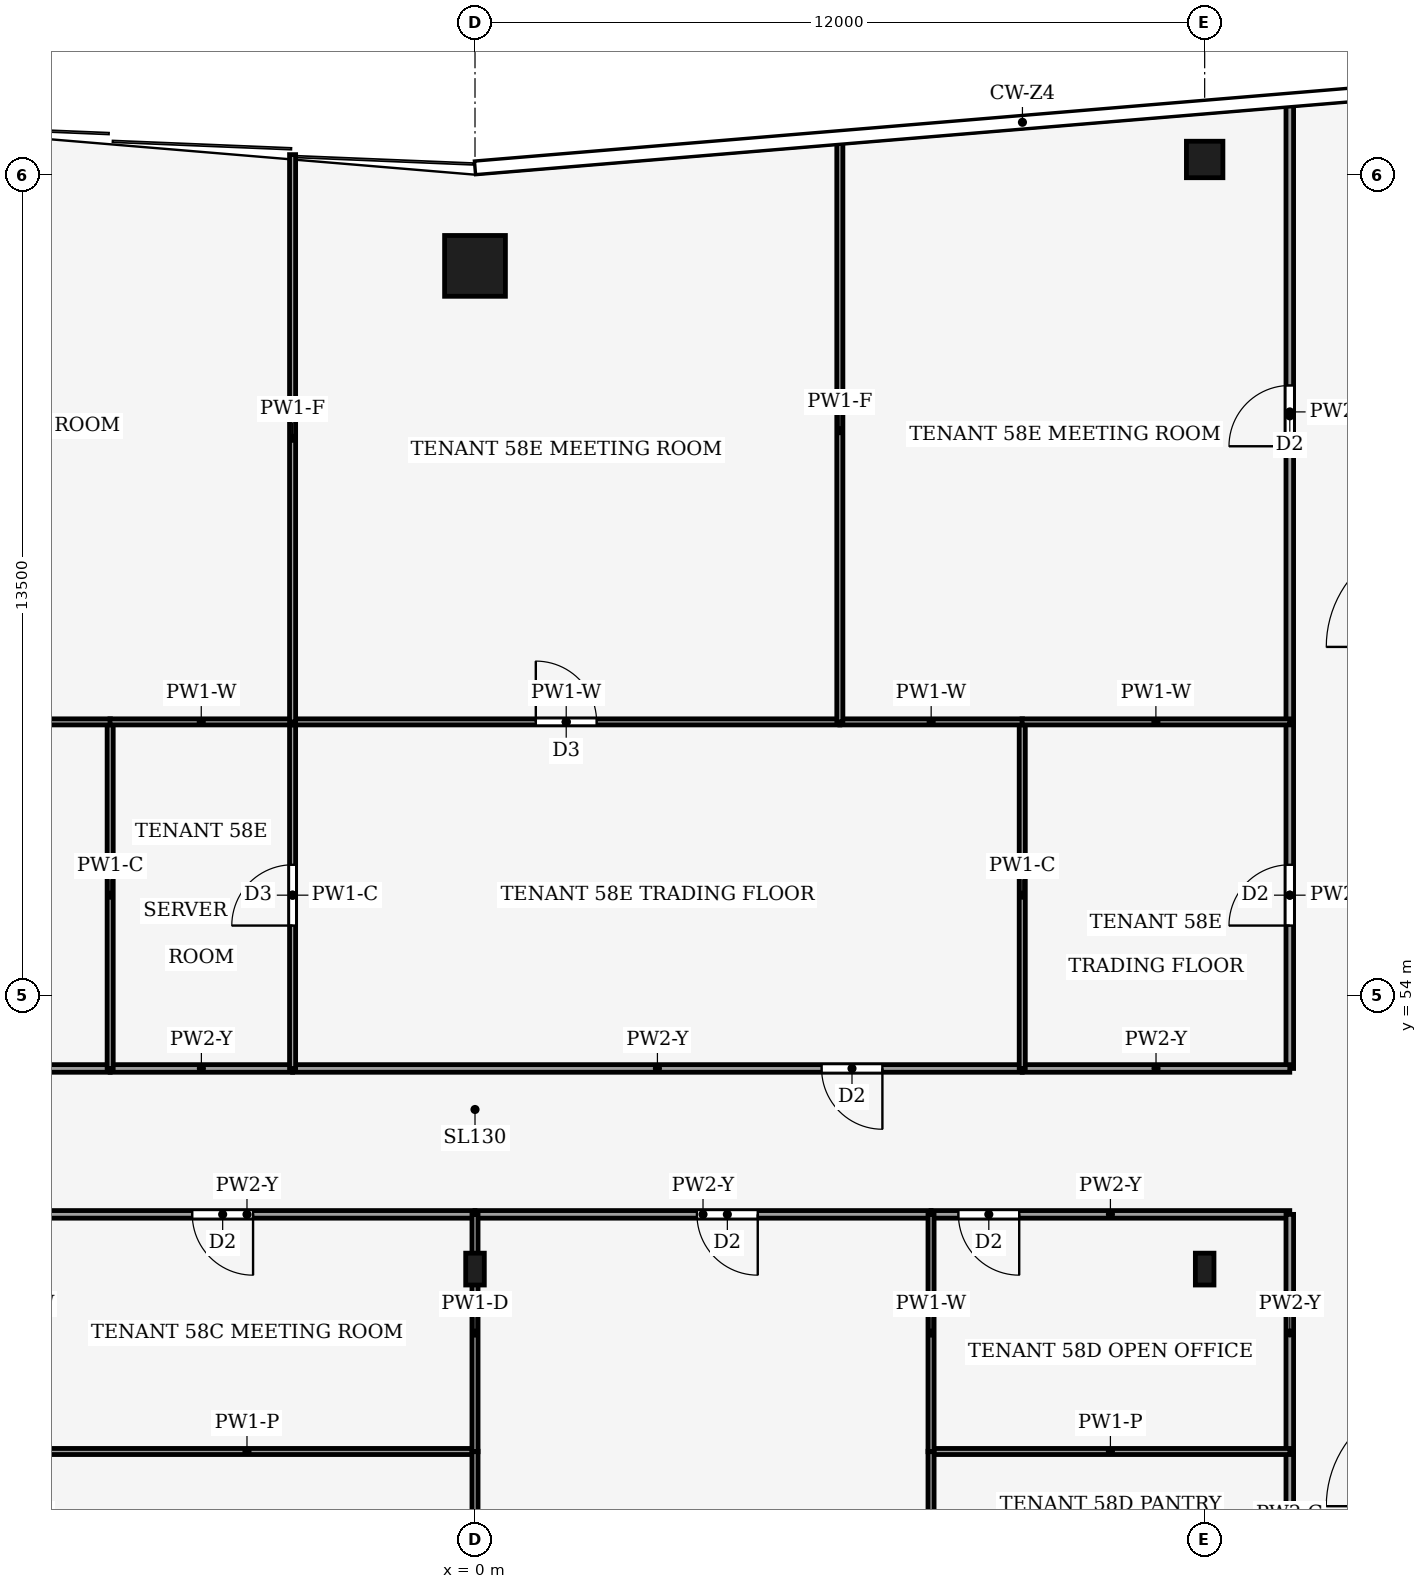
"""IFC4 building model, lengths in metres.
Left out: names, types, materials, properties, quantities, classifications, styles, units other than length and angle.
Written with IfcOpenShell. Run it as: python <this file> out.ifc"""

import sys

from ifc_helpers import new_model, si_unit, direction, frame, frame_2d, origin, origin_2d, place, context, subcontext, project, spatial, rectangle, hollow_rectangle, i_section, extrude, element, fill, save


model = new_model("IFC4")
c1 = context("Model", 3, precision=1e-05, world=origin(), true_north=direction((0.0, 1.0)))
c2 = subcontext(c1, "Body", "Model", "MODEL_VIEW")
j1 = project(units=[si_unit("LENGTHUNIT", "METRE"), si_unit("PLANEANGLEUNIT", "RADIAN")], contexts=[c1])
p1 = place(None, origin())
s1 = spatial("IfcSite", under=j1, at=p1, CompositionType="ELEMENT")
p2 = place(p1, origin())
s2 = spatial("IfcBuilding", under=s1, at=p2, CompositionType="ELEMENT")
p3 = place(p2, frame((0.0, 0.0, 254.0)))
s3 = spatial("IfcBuildingStorey", under=s2, at=p3, CompositionType="ELEMENT", Elevation=254.0)
p4 = place(p3, frame((0.0, 66.0, 0.0), z_axis=(0.0, 0.0, 1.0), x_axis=(1.0, 0.0, 0.0)))
e1 = element("IfcColumn", 1, at=p4, inside=s3, PredefinedType="COLUMN", context=c2, shape_type="SweptSolid", body=[
    extrude(hollow_rectangle(XDim=1.0, YDim=1.0, WallThickness=0.045, at=origin_2d()), origin(), (0.0, 0.0, 1.0), 4.0),
])
p5 = place(p3, frame((12.0, 67.75, 0.0), z_axis=(0.0, 0.0, 1.0), x_axis=(1.0, 0.0, 0.0)))
e2 = element("IfcColumn", 2, at=p5, inside=s3, PredefinedType="COLUMN", context=c2, shape_type="SweptSolid", body=[
    extrude(hollow_rectangle(XDim=0.6, YDim=0.6, WallThickness=0.025, at=origin_2d()), origin(), (0.0, 0.0, 1.0), 4.0),
])
for number, where, z_axis, x_axis in (
    (3, (0.0, 49.5, 0.0), (0.0, 0.0, 1.0), (1.0, 0.0, 0.0)),
    (4, (12.0, 49.5, 0.0), (0.0, 0.0, 1.0), (1.0, 0.0, 0.0)),
):
    element("IfcColumn", number, at=place(p3, frame(where, z_axis=z_axis, x_axis=x_axis)), inside=s3, PredefinedType="COLUMN", context=c2, shape_type="SweptSolid", body=[
        extrude(i_section(OverallWidth=0.306, OverallDepth=0.524, WebThickness=0.012, FlangeThickness=0.04, FilletRadius=0.027, at=origin_2d()), origin(), (0.0, 0.0, 1.0), 4.0),
    ])
p6 = place(p3, frame((0.0, 50.4, 0.0), z_axis=(0.0, 0.0, 1.0), x_axis=(-1.0, 0.0, 0.0)))
e5 = element("IfcWall", 5, at=p6, inside=s3, PredefinedType="PARTITIONING", context=c2, shape_type="SweptSolid", body=[
    extrude(rectangle(XDim=7.5, YDim=0.125, at=frame_2d((3.75, 0.0))), origin(), (0.0, 0.0, 1.0), 3.24),
])
p7 = place(p6, frame((3.65, 0.0, 0.0)))
e6 = element("IfcOpeningElement", 6, at=p7, cuts=e5, PredefinedType="OPENING", context=c2, shape_type="SweptSolid", body=[
    extrude(rectangle(XDim=1.0, YDim=2.1, at=frame_2d((0.5, 1.05))), frame((0.0, 0.073, 0.0), z_axis=(0.0, -1.0, 0.0), x_axis=(1.0, 0.0, 0.0)), (0.0, 0.0, 1.0), 0.145),
])
p8 = place(p3, frame((13.4, 43.5, 0.0), z_axis=(0.0, 0.0, 1.0), x_axis=(0.0, 1.0, 0.0)))
e7 = element("IfcWall", 7, at=p8, inside=s3, PredefinedType="PARTITIONING", context=c2, shape_type="SweptSolid", body=[
    extrude(rectangle(XDim=3.0, YDim=0.125, at=frame_2d((1.5, 0.0))), origin(), (0.0, 0.0, 1.0), 3.87),
])
p9 = place(p3, frame((13.4, 50.4, 0.0), z_axis=(0.0, 0.0, 1.0), x_axis=(-1.0, 0.0, 0.0)))
e8 = element("IfcWall", 8, at=p9, inside=s3, PredefinedType="PARTITIONING", context=c2, shape_type="SweptSolid", body=[
    extrude(rectangle(XDim=5.9, YDim=0.125, at=frame_2d((2.95, 0.0))), origin(), (0.0, 0.0, 1.0), 3.24),
])
p10 = place(p9, frame((4.45, 0.0, 0.0)))
e9 = element("IfcOpeningElement", 9, at=p10, cuts=e8, PredefinedType="OPENING", context=c2, shape_type="SweptSolid", body=[
    extrude(rectangle(XDim=1.0, YDim=2.1, at=frame_2d((0.5, 1.05))), frame((0.0, 0.073, 0.0), z_axis=(0.0, -1.0, 0.0), x_axis=(1.0, 0.0, 0.0)), (0.0, 0.0, 1.0), 0.145),
])
p11 = place(p3, frame((13.4, 46.5, 0.0), z_axis=(0.0, 0.0, 1.0), x_axis=(0.0, 1.0, 0.0)))
e10 = element("IfcWall", 10, at=p11, inside=s3, PredefinedType="PARTITIONING", context=c2, shape_type="SweptSolid", body=[
    extrude(rectangle(XDim=3.9, YDim=0.125, at=frame_2d((1.95, 0.0))), origin(), (0.0, 0.0, 1.0), 3.24),
])
p12 = place(p3, frame((7.5, 50.4, 0.0), z_axis=(0.0, 0.0, 1.0), x_axis=(-1.0, 0.0, 0.0)))
e11 = element("IfcWall", 11, at=p12, inside=s3, PredefinedType="PARTITIONING", context=c2, shape_type="SweptSolid", body=[
    extrude(rectangle(XDim=7.5, YDim=0.125, at=frame_2d((3.75, 0.0))), origin(), (0.0, 0.0, 1.0), 3.24),
])
p13 = place(p12, frame((2.85, 0.0, 0.0)))
e12 = element("IfcOpeningElement", 12, at=p13, cuts=e11, PredefinedType="OPENING", context=c2, shape_type="SweptSolid", body=[
    extrude(rectangle(XDim=1.0, YDim=2.1, at=frame_2d((0.5, 1.05))), frame((0.0, 0.073, 0.0), z_axis=(0.0, -1.0, 0.0), x_axis=(1.0, 0.0, 0.0)), (0.0, 0.0, 1.0), 0.145),
])
p14 = place(p3, frame((-13.4, 52.8, 0.0), z_axis=(0.0, 0.0, 1.0), x_axis=(1.0, 0.0, 0.0)))
e13 = element("IfcWall", 13, at=p14, inside=s3, PredefinedType="PARTITIONING", context=c2, shape_type="SweptSolid", body=[
    extrude(rectangle(XDim=7.4, YDim=0.125, at=frame_2d((3.7, 0.0))), origin(), (0.0, 0.0, 1.0), 3.24),
])
p15 = place(p14, frame((3.2, 0.0, 0.0)))
e14 = element("IfcOpeningElement", 14, at=p15, cuts=e13, PredefinedType="OPENING", context=c2, shape_type="SweptSolid", body=[
    extrude(rectangle(XDim=1.0, YDim=2.1, at=frame_2d((0.5, 1.05))), frame((0.0, 0.073, 0.0), z_axis=(0.0, -1.0, 0.0), x_axis=(1.0, 0.0, 0.0)), (0.0, 0.0, 1.0), 0.145),
])
p16 = place(p3, frame((-3.0, 52.8, 0.0), z_axis=(0.0, 0.0, 1.0), x_axis=(-1.0, 0.0, 0.0)))
e15 = element("IfcWall", 15, at=p16, inside=s3, PredefinedType="PARTITIONING", context=c2, shape_type="SweptSolid", body=[
    extrude(rectangle(XDim=3.0, YDim=0.125, at=frame_2d((1.5, 0.0))), origin(), (0.0, 0.0, 1.0), 3.24),
])
p17 = place(p3, frame((9.0, 52.8, 0.0), z_axis=(0.0, 0.0, 1.0), x_axis=(-1.0, 0.0, 0.0)))
e16 = element("IfcWall", 16, at=p17, inside=s3, PredefinedType="PARTITIONING", context=c2, shape_type="SweptSolid", body=[
    extrude(rectangle(XDim=12.0, YDim=0.125, at=frame_2d((6.0, 0.0))), origin(), (0.0, 0.0, 1.0), 3.24),
])
p18 = place(p17, frame((2.3, 0.0, 0.0)))
e17 = element("IfcOpeningElement", 17, at=p18, cuts=e16, PredefinedType="OPENING", context=c2, shape_type="SweptSolid", body=[
    extrude(rectangle(XDim=1.0, YDim=2.1, at=frame_2d((0.5, 1.05))), frame((0.0, 0.073, 0.0), z_axis=(0.0, -1.0, 0.0), x_axis=(1.0, 0.0, 0.0)), (0.0, 0.0, 1.0), 0.145),
])
p19 = place(p3, frame((13.4, 52.8, 0.0), z_axis=(0.0, 0.0, 1.0), x_axis=(0.0, 1.0, 0.0)))
e18 = element("IfcWall", 18, at=p19, inside=s3, PredefinedType="PARTITIONING", context=c2, shape_type="SweptSolid", body=[
    extrude(rectangle(XDim=5.7, YDim=0.125, at=frame_2d((2.85, 0.0))), origin(), (0.0, 0.0, 1.0), 3.87),
])
p20 = place(p19, frame((2.35, 0.0, 0.0)))
e19 = element("IfcOpeningElement", 19, at=p20, cuts=e18, PredefinedType="OPENING", context=c2, shape_type="SweptSolid", body=[
    extrude(rectangle(XDim=1.0, YDim=2.1, at=frame_2d((0.5, 1.05))), frame((0.0, 0.073, 0.0), z_axis=(0.0, -1.0, 0.0), x_axis=(1.0, 0.0, 0.0)), (0.0, 0.0, 1.0), 0.145),
])
p21 = place(p3, frame((13.4, 52.8, 0.0), z_axis=(0.0, 0.0, 1.0), x_axis=(-1.0, 0.0, 0.0)))
e20 = element("IfcWall", 20, at=p21, inside=s3, PredefinedType="PARTITIONING", context=c2, shape_type="SweptSolid", body=[
    extrude(rectangle(XDim=4.4, YDim=0.125, at=frame_2d((2.2, 0.0))), origin(), (0.0, 0.0, 1.0), 3.24),
])
p22 = place(p3, frame((13.4, 58.5, 0.0), z_axis=(0.0, 0.0, 1.0), x_axis=(0.0, 1.0, 0.0)))
e21 = element("IfcWall", 21, at=p22, inside=s3, PredefinedType="PARTITIONING", context=c2, shape_type="SweptSolid", body=[
    extrude(rectangle(XDim=10.197, YDim=0.125, at=frame_2d((5.098, 0.0))), origin(), (0.0, 0.0, 1.0), 3.04),
])
p23 = place(p22, frame((4.533, 0.0, 0.0)))
e22 = element("IfcOpeningElement", 22, at=p23, cuts=e21, PredefinedType="OPENING", context=c2, shape_type="SweptSolid", body=[
    extrude(rectangle(XDim=1.0, YDim=2.1, at=frame_2d((0.5, 1.05))), frame((0.0, 0.073, 0.0), z_axis=(0.0, -1.0, 0.0), x_axis=(1.0, 0.0, 0.0)), (0.0, 0.0, 1.0), 0.145),
])
p24 = place(p3, frame((0.0, 46.5, 0.0), z_axis=(0.0, 0.0, 1.0), x_axis=(-1.0, 0.0, 0.0)))
e23 = element("IfcWall", 23, at=p24, inside=s3, PredefinedType="PARTITIONING", context=c2, shape_type="SweptSolid", body=[
    extrude(rectangle(XDim=7.5, YDim=0.1, at=frame_2d((3.75, 0.0))), origin(), (0.0, 0.0, 1.0), 3.44),
])
p25 = place(p3, frame((0.0, 38.4, 0.0), z_axis=(0.0, 0.0, 1.0), x_axis=(0.0, 1.0, 0.0)))
e24 = element("IfcWall", 24, at=p25, inside=s3, PredefinedType="PARTITIONING", context=c2, shape_type="SweptSolid", body=[
    extrude(rectangle(XDim=8.104, YDim=0.1, at=frame_2d((4.052, 0.0))), origin(), (0.0, 0.0, 1.0), 3.44),
])
p26 = place(p3, frame((0.0, 46.496, 0.0), z_axis=(0.0, 0.0, 1.0), x_axis=(0.0, 1.0, 0.0)))
e25 = element("IfcWall", 25, at=p26, inside=s3, PredefinedType="PARTITIONING", context=c2, shape_type="SweptSolid", body=[
    extrude(rectangle(XDim=3.904, YDim=0.1, at=frame_2d((1.952, 0.0))), origin(), (0.0, 0.0, 1.0), 3.29),
])
p27 = place(p3, frame((13.4, 46.5, 0.0), z_axis=(0.0, 0.0, 1.0), x_axis=(-1.0, 0.0, 0.0)))
e26 = element("IfcWall", 26, at=p27, inside=s3, PredefinedType="PARTITIONING", context=c2, shape_type="SweptSolid", body=[
    extrude(rectangle(XDim=5.9, YDim=0.1, at=frame_2d((2.95, 0.0))), origin(), (0.0, 0.0, 1.0), 3.44),
])
p28 = place(p3, frame((7.5, 46.504, 0.0), z_axis=(0.0, 0.0, 1.0), x_axis=(0.0, -1.0, 0.0)))
e27 = element("IfcWall", 27, at=p28, inside=s3, PredefinedType="PARTITIONING", context=c2, shape_type="SweptSolid", body=[
    extrude(rectangle(XDim=3.008, YDim=0.1, at=frame_2d((1.504, 0.0))), origin(), (0.0, 0.0, 1.0), 3.87),
])
p29 = place(p28, frame((1.004, 0.0, 0.0)))
e28 = element("IfcOpeningElement", 28, at=p29, cuts=e27, PredefinedType="OPENING", context=c2, shape_type="SweptSolid", body=[
    extrude(rectangle(XDim=1.0, YDim=2.1, at=frame_2d((0.5, 1.05))), frame((0.0, 0.06, 0.0), z_axis=(0.0, -1.0, 0.0), x_axis=(1.0, 0.0, 0.0)), (0.0, 0.0, 1.0), 0.12),
])
p30 = place(p3, frame((7.5, 50.4, 0.0), z_axis=(0.0, 0.0, 1.0), x_axis=(0.0, -1.0, 0.0)))
e29 = element("IfcWall", 29, at=p30, inside=s3, PredefinedType="PARTITIONING", context=c2, shape_type="SweptSolid", body=[
    extrude(rectangle(XDim=3.904, YDim=0.1, at=frame_2d((1.952, 0.0))), origin(), (0.0, 0.0, 1.0), 3.24),
])
p31 = place(p3, frame((-6.0, 52.8, 0.0), z_axis=(0.0, 0.0, 1.0), x_axis=(0.0, 1.0, 0.0)))
e30 = element("IfcWall", 30, at=p31, inside=s3, PredefinedType="PARTITIONING", context=c2, shape_type="SweptSolid", body=[
    extrude(rectangle(XDim=5.7, YDim=0.1, at=frame_2d((2.85, 0.0))), origin(), (0.0, 0.0, 1.0), 3.87),
])
p32 = place(p3, frame((-5.996, 58.5, 0.0), z_axis=(0.0, 0.0, 1.0), x_axis=(-1.0, 0.0, 0.0)))
e31 = element("IfcWall", 31, at=p32, inside=s3, PredefinedType="PARTITIONING", context=c2, shape_type="SweptSolid", body=[
    extrude(rectangle(XDim=7.404, YDim=0.1, at=frame_2d((3.702, 0.0))), origin(), (0.0, 0.0, 1.0), 3.24),
])
p33 = place(p3, frame((-3.0, 52.8, 0.0), z_axis=(0.0, 0.0, 1.0), x_axis=(0.0, 1.0, 0.0)))
e32 = element("IfcWall", 32, at=p33, inside=s3, PredefinedType="PARTITIONING", context=c2, shape_type="SweptSolid", body=[
    extrude(rectangle(XDim=5.7, YDim=0.1, at=frame_2d((2.85, 0.0))), origin(), (0.0, 0.0, 1.0), 3.87),
])
p34 = place(p33, frame((2.35, 0.0, 0.0)))
e33 = element("IfcOpeningElement", 33, at=p34, cuts=e32, PredefinedType="OPENING", context=c2, shape_type="SweptSolid", body=[
    extrude(rectangle(XDim=1.0, YDim=2.1, at=frame_2d((0.5, 1.05))), frame((0.0, 0.06, 0.0), z_axis=(0.0, -1.0, 0.0), x_axis=(1.0, 0.0, 0.0)), (0.0, 0.0, 1.0), 0.12),
])
p35 = place(p3, frame((-3.0, 58.5, 0.0), z_axis=(0.0, 0.0, 1.0), x_axis=(-1.0, 0.0, 0.0)))
e34 = element("IfcWall", 34, at=p35, inside=s3, PredefinedType="PARTITIONING", context=c2, shape_type="SweptSolid", body=[
    extrude(rectangle(XDim=3.004, YDim=0.1, at=frame_2d((1.502, 0.0))), origin(), (0.0, 0.0, 1.0), 3.24),
])
p36 = place(p3, frame((9.0, 52.8, 0.0), z_axis=(0.0, 0.0, 1.0), x_axis=(0.0, 1.0, 0.0)))
e35 = element("IfcWall", 35, at=p36, inside=s3, PredefinedType="PARTITIONING", context=c2, shape_type="SweptSolid", body=[
    extrude(rectangle(XDim=5.7, YDim=0.1, at=frame_2d((2.85, 0.0))), origin(), (0.0, 0.0, 1.0), 3.87),
])
p37 = place(p3, frame((-3.0, 58.5, 0.0), z_axis=(0.0, 0.0, 1.0), x_axis=(1.0, 0.0, 0.0)))
e36 = element("IfcWall", 36, at=p37, inside=s3, PredefinedType="PARTITIONING", context=c2, shape_type="SweptSolid", body=[
    extrude(rectangle(XDim=9.0, YDim=0.1, at=frame_2d((4.5, 0.0))), origin(), (0.0, 0.0, 1.0), 3.24),
])
p38 = place(p37, frame((4.0, 0.0, 0.0)))
e37 = element("IfcOpeningElement", 37, at=p38, cuts=e36, PredefinedType="OPENING", context=c2, shape_type="SweptSolid", body=[
    extrude(rectangle(XDim=1.0, YDim=2.1, at=frame_2d((0.5, 1.05))), frame((0.0, 0.06, 0.0), z_axis=(0.0, -1.0, 0.0), x_axis=(1.0, 0.0, 0.0)), (0.0, 0.0, 1.0), 0.12),
])
p39 = place(p3, frame((9.004, 58.5, 0.0), z_axis=(0.0, 0.0, 1.0), x_axis=(-1.0, 0.0, 0.0)))
e38 = element("IfcWall", 38, at=p39, inside=s3, PredefinedType="PARTITIONING", context=c2, shape_type="SweptSolid", body=[
    extrude(rectangle(XDim=3.004, YDim=0.1, at=frame_2d((1.502, 0.0))), origin(), (0.0, 0.0, 1.0), 3.24),
])
p40 = place(p3, frame((13.4, 58.5, 0.0), z_axis=(0.0, 0.0, 1.0), x_axis=(-1.0, 0.0, 0.0)))
e39 = element("IfcWall", 39, at=p40, inside=s3, PredefinedType="PARTITIONING", context=c2, shape_type="SweptSolid", body=[
    extrude(rectangle(XDim=4.404, YDim=0.1, at=frame_2d((2.202, 0.0))), origin(), (0.0, 0.0, 1.0), 3.24),
])
p41 = place(p3, frame((-3.0, 58.5, 0.0), z_axis=(0.0, 0.0, 1.0), x_axis=(0.0, 1.0, 0.0)))
e40 = element("IfcWall", 40, at=p41, inside=s3, PredefinedType="PARTITIONING", context=c2, shape_type="SweptSolid", body=[
    extrude(rectangle(XDim=9.33, YDim=0.1, at=frame_2d((4.665, 0.0))), origin(), (0.0, 0.0, 1.0), 3.04),
])
p42 = place(p3, frame((6.0, 58.5, 0.0), z_axis=(0.0, 0.0, 1.0), x_axis=(0.0, 1.0, 0.0)))
e41 = element("IfcWall", 41, at=p42, inside=s3, PredefinedType="PARTITIONING", context=c2, shape_type="SweptSolid", body=[
    extrude(rectangle(XDim=9.58, YDim=0.1, at=frame_2d((4.79, 0.0))), origin(), (0.0, 0.0, 1.0), 3.04),
])
p43 = place(p7, origin())
e42 = element("IfcDoor", 42, at=p43, inside=s3, OperationType="SINGLE_SWING_RIGHT", PredefinedType="DOOR", context=c2, shape_type="SweptSolid", body=[
    extrude(rectangle(XDim=1.0, YDim=2.1, at=frame_2d((0.5, 1.05))), frame((0.0, 0.025, 0.0), z_axis=(0.0, -1.0, 0.0), x_axis=(1.0, 0.0, 0.0)), (0.0, 0.0, 1.0), 0.05),
])
fill(e6, e42)
p44 = place(p10, origin())
e43 = element("IfcDoor", 43, at=p44, inside=s3, OperationType="SINGLE_SWING_RIGHT", PredefinedType="DOOR", context=c2, shape_type="SweptSolid", body=[
    extrude(rectangle(XDim=1.0, YDim=2.1, at=frame_2d((0.5, 1.05))), frame((0.0, 0.025, 0.0), z_axis=(0.0, -1.0, 0.0), x_axis=(1.0, 0.0, 0.0)), (0.0, 0.0, 1.0), 0.05),
])
fill(e9, e43)
p45 = place(p13, origin())
e44 = element("IfcDoor", 44, at=p45, inside=s3, OperationType="SINGLE_SWING_LEFT", PredefinedType="DOOR", context=c2, shape_type="SweptSolid", body=[
    extrude(rectangle(XDim=1.0, YDim=2.1, at=frame_2d((0.5, 1.05))), frame((0.0, 0.025, 0.0), z_axis=(0.0, -1.0, 0.0), x_axis=(1.0, 0.0, 0.0)), (0.0, 0.0, 1.0), 0.05),
])
fill(e12, e44)
p46 = place(p18, origin())
e45 = element("IfcDoor", 45, at=p46, inside=s3, OperationType="SINGLE_SWING_LEFT", PredefinedType="DOOR", context=c2, shape_type="SweptSolid", body=[
    extrude(rectangle(XDim=1.0, YDim=2.1, at=frame_2d((0.5, 1.05))), frame((0.0, 0.025, 0.0), z_axis=(0.0, -1.0, 0.0), x_axis=(1.0, 0.0, 0.0)), (0.0, 0.0, 1.0), 0.05),
])
fill(e17, e45)
p47 = place(p20, origin())
e46 = element("IfcDoor", 46, at=p47, inside=s3, OperationType="SINGLE_SWING_RIGHT", PredefinedType="DOOR", context=c2, shape_type="SweptSolid", body=[
    extrude(rectangle(XDim=1.0, YDim=2.1, at=frame_2d((0.5, 1.05))), frame((0.0, 0.025, 0.0), z_axis=(0.0, -1.0, 0.0), x_axis=(1.0, 0.0, 0.0)), (0.0, 0.0, 1.0), 0.05),
])
fill(e19, e46)
p48 = place(p23, origin())
e47 = element("IfcDoor", 47, at=p48, inside=s3, OperationType="SINGLE_SWING_LEFT", PredefinedType="DOOR", context=c2, shape_type="SweptSolid", body=[
    extrude(rectangle(XDim=1.0, YDim=2.1, at=frame_2d((0.5, 1.05))), frame((0.0, 0.025, 0.0), z_axis=(0.0, -1.0, 0.0), x_axis=(1.0, 0.0, 0.0)), (0.0, 0.0, 1.0), 0.05),
])
fill(e22, e47)
p49 = place(p34, origin())
e48 = element("IfcDoor", 48, at=p49, inside=s3, OperationType="SINGLE_SWING_RIGHT", PredefinedType="DOOR", context=c2, shape_type="SweptSolid", body=[
    extrude(rectangle(XDim=1.0, YDim=2.1, at=frame_2d((0.5, 1.05))), frame((0.0, 0.025, 0.0), z_axis=(0.0, -1.0, 0.0), x_axis=(1.0, 0.0, 0.0)), (0.0, 0.0, 1.0), 0.05),
])
fill(e33, e48)
p50 = place(p38, origin())
e49 = element("IfcDoor", 49, at=p50, inside=s3, OperationType="SINGLE_SWING_LEFT", PredefinedType="DOOR", context=c2, shape_type="SweptSolid", body=[
    extrude(rectangle(XDim=1.0, YDim=2.1, at=frame_2d((0.5, 1.05))), frame((0.0, 0.025, 0.0), z_axis=(0.0, -1.0, 0.0), x_axis=(1.0, 0.0, 0.0)), (0.0, 0.0, 1.0), 0.05),
])
fill(e37, e49)
save(model, sys.argv[1])
